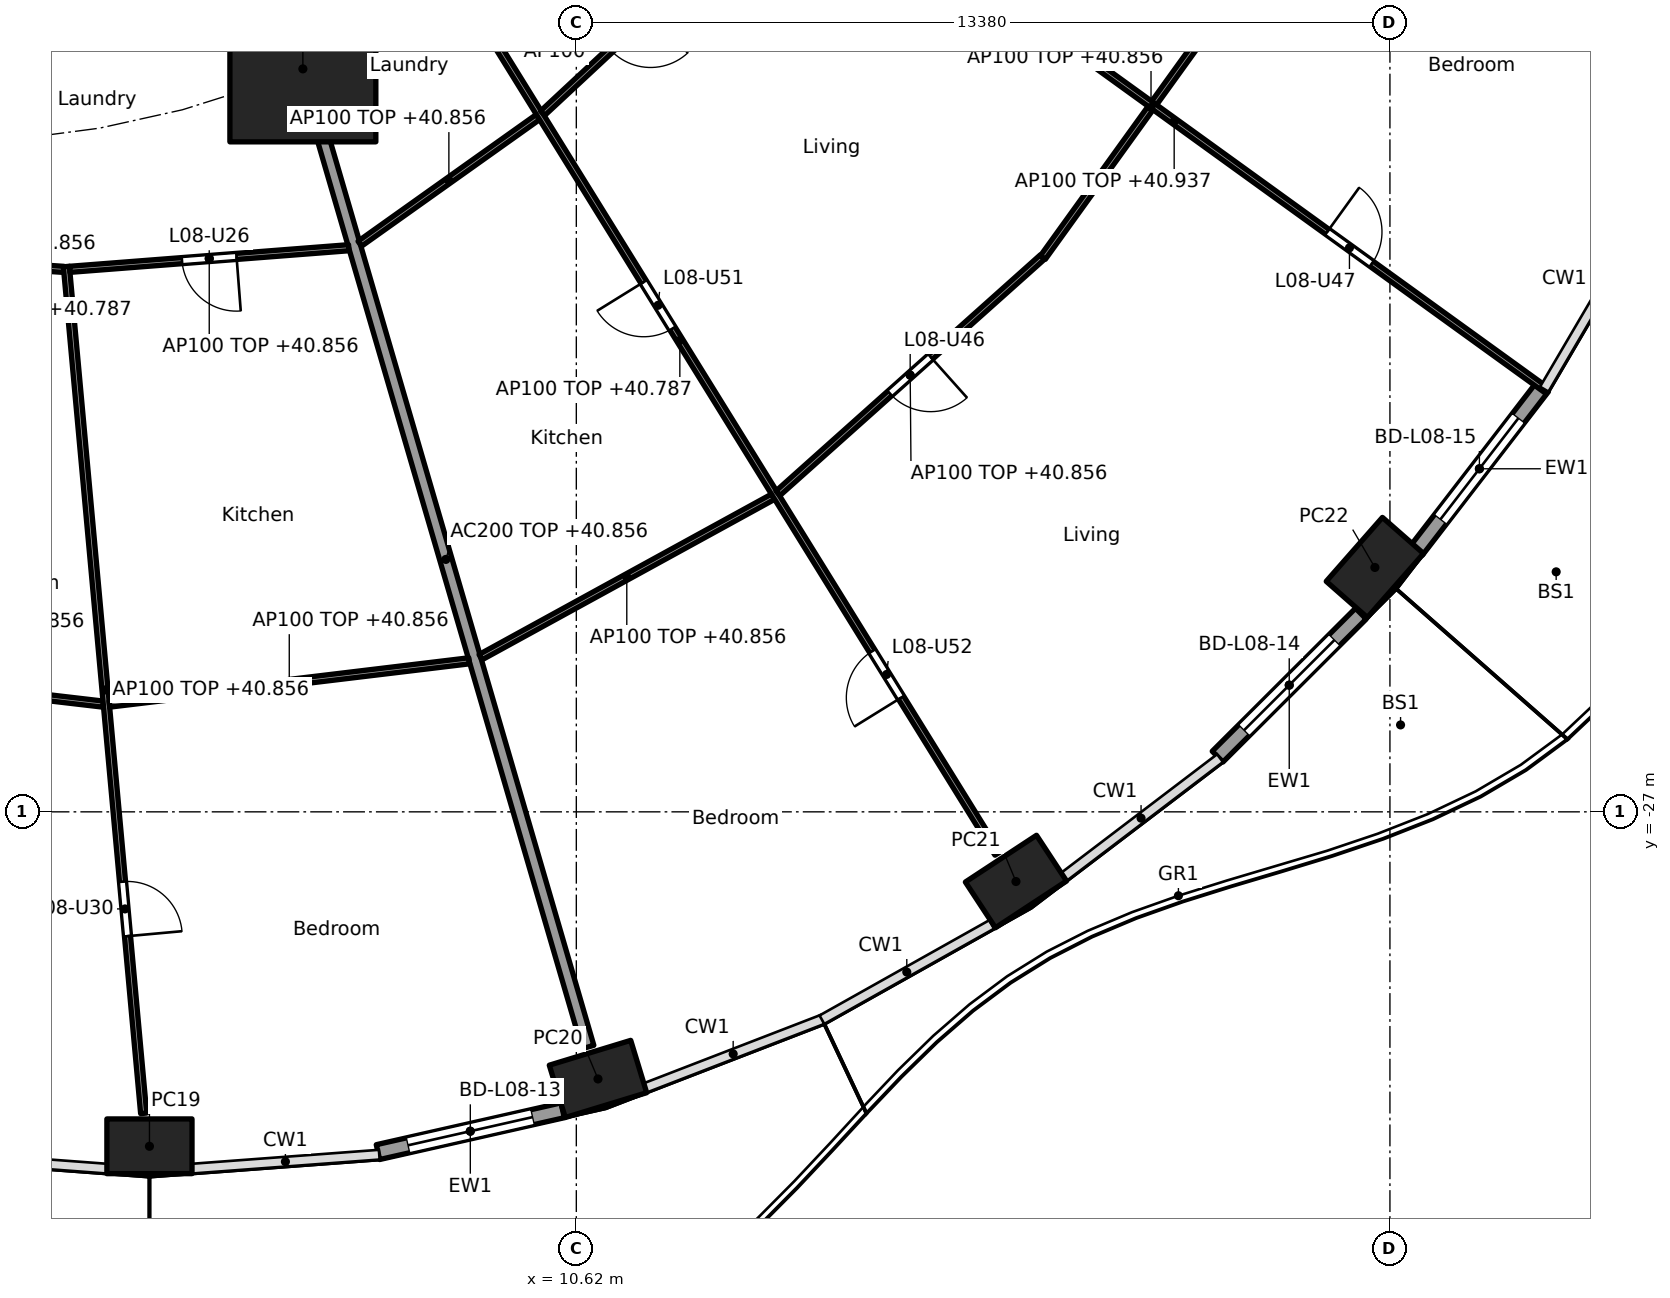
"""IFC4 building model, lengths in metres.
Left out: names, types, materials, properties, quantities, classifications, styles, units other than length and angle.
Written with IfcOpenShell. Run it as: python <this file> out.ifc"""

import sys

from ifc_helpers import new_model, si_unit, direction, frame, frame_2d, origin, origin_2d, place, context, subcontext, project, spatial, rectangle, hollow_rectangle, extrude, element, fill, save


model = new_model("IFC4")
c1 = context("Model", 3, precision=1e-05, world=origin(), true_north=direction((0.0, 1.0)))
c2 = subcontext(c1, "Body", "Model", "MODEL_VIEW")
j1 = project(units=[si_unit("LENGTHUNIT", "METRE"), si_unit("PLANEANGLEUNIT", "RADIAN")], contexts=[c1])
p1 = place(None, origin())
s1 = spatial("IfcSite", under=j1, at=p1, CompositionType="ELEMENT")
p2 = place(p1, origin())
s2 = spatial("IfcBuilding", under=s1, at=p2, CompositionType="ELEMENT")
p3 = place(p2, frame((0.0, 0.0, 38.1)))
s3 = spatial("IfcBuildingStorey", under=s2, at=p3, CompositionType="ELEMENT", Elevation=38.1)
for number, where, z_axis, x_axis in (
    (1, (3.6, -32.5, 0.0), (0.0, 0.0, 1.0), (1.0, 0.0, 0.0)),
    (2, (10.976, -31.393, 0.0), (0.0, 0.0, 1.0), (0.957, 0.292, 0.0)),
    (3, (17.85, -28.146, 0.0), (0.0, 0.0, 1.0), (0.836, 0.549, 0.0)),
    (4, (23.752, -22.981, 0.0), (0.0, 0.0, 1.0), (0.66, 0.751, 0.0)),
):
    element("IfcColumn", number, at=place(p3, frame(where, z_axis=z_axis, x_axis=x_axis)), inside=s3, PredefinedType="COLUMN", context=c2, shape_type="SweptSolid", body=[
        extrude(hollow_rectangle(XDim=1.4, YDim=0.9, WallThickness=0.05, at=origin_2d()), origin(), (0.0, 0.0, 1.0), 3.7),
    ])
p4 = place(p3, frame((6.123, -14.782, 0.0), z_axis=(0.0, 0.0, 1.0), x_axis=(1.0, 0.0, 0.0)))
e5 = element("IfcColumn", 5, at=p4, inside=s3, PredefinedType="COLUMN", context=c2, shape_type="SweptSolid", body=[
    extrude(rectangle(XDim=2.4, YDim=2.4, at=origin_2d()), origin(), (0.0, 0.0, 1.0), 3.7),
])
p5 = place(p3, frame((10.396, -31.908, 0.0), z_axis=(0.0, 0.0, 1.0), x_axis=(-0.97533495413, -0.220729987208, 0.0)))
e6 = element("IfcWall", 6, at=p5, inside=s3, PredefinedType="SOLIDWALL", context=c2, shape_type="SweptSolid", body=[
    extrude(rectangle(XDim=3.115, YDim=0.25, at=frame_2d((1.557, 0.0))), origin(), (0.0, 0.0, 1.0), 3.44),
])
p6 = place(p5, frame((0.507, 0.0, 0.0)))
e7 = element("IfcOpeningElement", 7, at=p6, cuts=e6, PredefinedType="OPENING", context=c2, shape_type="SweptSolid", body=[
    extrude(rectangle(XDim=2.1, YDim=2.4, at=frame_2d((1.05, 1.2))), frame((0.0, 0.135, 0.0), z_axis=(0.0, -1.0, 0.0), x_axis=(1.0, 0.0, 0.0)), (0.0, 0.0, 1.0), 0.27),
])
p7 = place(p3, frame((23.522, -23.74, 0.0), z_axis=(0.0, 0.0, 1.0), x_axis=(-0.707803094595, -0.706409781417, 0.0)))
e8 = element("IfcWall", 8, at=p7, inside=s3, PredefinedType="SOLIDWALL", context=c2, shape_type="SweptSolid", body=[
    extrude(rectangle(XDim=3.329, YDim=0.25, at=frame_2d((1.665, 0.0))), origin(), (0.0, 0.0, 1.0), 3.44),
])
p8 = place(p7, frame((0.615, 0.0, 0.0)))
e9 = element("IfcOpeningElement", 9, at=p8, cuts=e8, PredefinedType="OPENING", context=c2, shape_type="SweptSolid", body=[
    extrude(rectangle(XDim=2.1, YDim=2.4, at=frame_2d((1.05, 1.2))), frame((0.0, 0.135, 0.0), z_axis=(0.0, -1.0, 0.0), x_axis=(1.0, 0.0, 0.0)), (0.0, 0.0, 1.0), 0.27),
])
p9 = place(p3, frame((26.508, -20.013, 0.0), z_axis=(0.0, 0.0, 1.0), x_axis=(-0.610457147657, -0.792049285635, 0.0)))
e10 = element("IfcWall", 10, at=p9, inside=s3, PredefinedType="SOLIDWALL", context=c2, shape_type="SweptSolid", body=[
    extrude(rectangle(XDim=3.397, YDim=0.25, at=frame_2d((1.699, 0.0))), origin(), (0.0, 0.0, 1.0), 3.44),
])
p10 = place(p9, frame((0.649, 0.0, 0.0)))
e11 = element("IfcOpeningElement", 11, at=p10, cuts=e10, PredefinedType="OPENING", context=c2, shape_type="SweptSolid", body=[
    extrude(rectangle(XDim=2.1, YDim=2.4, at=frame_2d((1.05, 1.2))), frame((0.0, 0.135, 0.0), z_axis=(0.0, -1.0, 0.0), x_axis=(1.0, 0.0, 0.0)), (0.0, 0.0, 1.0), 0.27),
])
p11 = place(p3, frame((5.243, -12.657, 0.0), z_axis=(0.0, 0.0, 1.0), x_axis=(0.382707856524, -0.923869415315, 0.0)))
e12 = element("IfcWall", 12, at=p11, inside=s3, PredefinedType="PARTITIONING", context=c2, shape_type="SweptSolid", body=[
    extrude(rectangle(XDim=2.2, YDim=0.2, at=frame_2d((1.1, 0.0))), origin(), (0.0, 0.0, 1.0), 3.44),
])
p12 = place(p3, frame((6.137, -14.83, 0.0), z_axis=(0.0, 0.0, 1.0), x_axis=(0.27985745069, -0.960041565399, 0.0)))
e13 = element("IfcWall", 13, at=p12, inside=s3, PredefinedType="PARTITIONING", context=c2, shape_type="SweptSolid", body=[
    extrude(rectangle(XDim=16.705, YDim=0.2, at=frame_2d((8.353, 0.0))), origin(), (0.0, 0.0, 1.0), 2.756),
])
p13 = place(p3, frame((-3.031, -24.543, 0.0), z_axis=(0.0, 0.0, 1.0), x_axis=(0.993255612046, -0.115945198862, 0.0)))
e14 = element("IfcWall", 14, at=p13, inside=s3, PredefinedType="PARTITIONING", context=c2, shape_type="SweptSolid", body=[
    extrude(rectangle(XDim=5.913, YDim=0.1, at=frame_2d((2.956, 0.0))), origin(), (0.0, 0.0, 1.0), 2.756),
])
p14 = place(p3, frame((0.009, -17.934, 0.0), z_axis=(0.0, 0.0, 1.0), x_axis=(0.997794542617, -0.066378089183, 0.0)))
e15 = element("IfcWall", 15, at=p14, inside=s3, PredefinedType="PARTITIONING", context=c2, shape_type="SweptSolid", body=[
    extrude(rectangle(XDim=2.185, YDim=0.1, at=frame_2d((1.092, 0.0))), origin(), (0.0, 0.0, 1.0), 2.756),
])
p15 = place(p3, frame((2.234, -18.032, 0.0), z_axis=(0.0, 0.0, 1.0), x_axis=(0.090891502968, -0.995860800859, 0.0)))
e16 = element("IfcWall", 16, at=p15, inside=s3, PredefinedType="PARTITIONING", context=c2, shape_type="SweptSolid", body=[
    extrude(rectangle(XDim=13.984, YDim=0.1, at=frame_2d((6.992, 0.0))), origin(), (0.0, 0.0, 1.0), 2.756),
])
p16 = place(p15, frame((10.158, 0.0, 0.0)))
e17 = element("IfcOpeningElement", 17, at=p16, cuts=e16, PredefinedType="OPENING", context=c2, shape_type="SweptSolid", body=[
    extrude(rectangle(XDim=0.9, YDim=2.1, at=frame_2d((0.45, 1.05))), frame((0.0, 0.06, 0.0), z_axis=(0.0, -1.0, 0.0), x_axis=(1.0, 0.0, 0.0)), (0.0, 0.0, 1.0), 0.12),
])
p17 = place(p3, frame((2.288, -18.078, 0.0), z_axis=(0.0, 0.0, 1.0), x_axis=(0.99701850123, 0.077162868047, 0.0)))
e18 = element("IfcWall", 18, at=p17, inside=s3, PredefinedType="PARTITIONING", context=c2, shape_type="SweptSolid", body=[
    extrude(rectangle(XDim=4.604, YDim=0.1, at=frame_2d((2.302, 0.0))), origin(), (0.0, 0.0, 1.0), 2.756),
])
p18 = place(p17, frame((1.852, 0.0, 0.0)))
e19 = element("IfcOpeningElement", 19, at=p18, cuts=e18, PredefinedType="OPENING", context=c2, shape_type="SweptSolid", body=[
    extrude(rectangle(XDim=0.9, YDim=2.1, at=frame_2d((0.45, 1.05))), frame((0.0, 0.06, 0.0), z_axis=(0.0, -1.0, 0.0), x_axis=(1.0, 0.0, 0.0)), (0.0, 0.0, 1.0), 0.12),
])
p19 = place(p3, frame((2.941, -25.229, 0.0), z_axis=(0.0, 0.0, 1.0), x_axis=(0.992834127896, 0.119500604542, 0.0)))
e20 = element("IfcWall", 20, at=p19, inside=s3, PredefinedType="PARTITIONING", context=c2, shape_type="SweptSolid", body=[
    extrude(rectangle(XDim=5.959, YDim=0.1, at=frame_2d((2.98, 0.0))), origin(), (0.0, 0.0, 1.0), 2.756),
])
p20 = place(p3, frame((7.06, -17.657, 0.0), z_axis=(0.0, 0.0, 1.0), x_axis=(0.81492039338, 0.57957290521, 0.0)))
e21 = element("IfcWall", 21, at=p20, inside=s3, PredefinedType="PARTITIONING", context=c2, shape_type="SweptSolid", body=[
    extrude(rectangle(XDim=3.594, YDim=0.1, at=frame_2d((1.797, 0.0))), origin(), (0.0, 0.0, 1.0), 2.756),
])
p21 = place(p3, frame((9.045, -24.456, 0.0), z_axis=(0.0, 0.0, 1.0), x_axis=(0.876809987787, 0.480837025734, 0.0)))
e22 = element("IfcWall", 22, at=p21, inside=s3, PredefinedType="PARTITIONING", context=c2, shape_type="SweptSolid", body=[
    extrude(rectangle(XDim=5.486, YDim=0.1, at=frame_2d((2.743, 0.0))), origin(), (0.0, 0.0, 1.0), 2.756),
])
p22 = place(p3, frame((7.097, -10.81, 0.0), z_axis=(0.0, 0.0, 1.0), x_axis=(0.526453266471, -0.850204068576, 0.0)))
e23 = element("IfcWall", 23, at=p22, inside=s3, PredefinedType="PARTITIONING", context=c2, shape_type="SweptSolid", body=[
    extrude(rectangle(XDim=19.85, YDim=0.1, at=frame_2d((9.925, 0.0))), origin(), (0.0, 0.0, 1.0), 2.687),
])
p23 = place(p22, frame((0.35, 0.0, 0.0)))
e24 = element("IfcOpeningElement", 24, at=p23, cuts=e23, PredefinedType="OPENING", context=c2, shape_type="SweptSolid", body=[
    extrude(rectangle(XDim=0.9, YDim=2.1, at=frame_2d((0.45, 1.05))), frame((0.0, 0.06, 0.0), z_axis=(0.0, -1.0, 0.0), x_axis=(1.0, 0.0, 0.0)), (0.0, 0.0, 1.0), 0.12),
])
p24 = place(p22, frame((8.795, 0.0, 0.0)))
e25 = element("IfcOpeningElement", 25, at=p24, cuts=e23, PredefinedType="OPENING", context=c2, shape_type="SweptSolid", body=[
    extrude(rectangle(XDim=0.9, YDim=2.1, at=frame_2d((0.45, 1.05))), frame((0.0, 0.06, 0.0), z_axis=(0.0, -1.0, 0.0), x_axis=(1.0, 0.0, 0.0)), (0.0, 0.0, 1.0), 0.12),
])
p25 = place(p22, frame((15.935, 0.0, 0.0)))
e26 = element("IfcOpeningElement", 26, at=p25, cuts=e23, PredefinedType="OPENING", context=c2, shape_type="SweptSolid", body=[
    extrude(rectangle(XDim=0.9, YDim=2.1, at=frame_2d((0.45, 1.05))), frame((0.0, 0.06, 0.0), z_axis=(0.0, -1.0, 0.0), x_axis=(1.0, 0.0, 0.0)), (0.0, 0.0, 1.0), 0.12),
])
p26 = place(p3, frame((10.066, -15.511, 0.0), z_axis=(0.0, 0.0, 1.0), x_axis=(0.732022571638, 0.681280378855, 0.0)))
e27 = element("IfcWall", 27, at=p26, inside=s3, PredefinedType="PARTITIONING", context=c2, shape_type="SweptSolid", body=[
    extrude(rectangle(XDim=3.95, YDim=0.1, at=frame_2d((1.975, 0.0))), origin(), (0.0, 0.0, 1.0), 3.44),
])
p27 = place(p26, frame((1.525, 0.0, 0.0)))
e28 = element("IfcOpeningElement", 28, at=p27, cuts=e27, PredefinedType="OPENING", context=c2, shape_type="SweptSolid", body=[
    extrude(rectangle(XDim=0.9, YDim=2.1, at=frame_2d((0.45, 1.05))), frame((0.0, 0.06, 0.0), z_axis=(0.0, -1.0, 0.0), x_axis=(1.0, 0.0, 0.0)), (0.0, 0.0, 1.0), 0.12),
])
p28 = place(p3, frame((13.936, -21.761, 0.0), z_axis=(0.0, 0.0, 1.0), x_axis=(0.745806142791, 0.666163041136, 0.0)))
e29 = element("IfcWall", 29, at=p28, inside=s3, PredefinedType="PARTITIONING", context=c2, shape_type="SweptSolid", body=[
    extrude(rectangle(XDim=5.831, YDim=0.1, at=frame_2d((2.915, 0.0))), origin(), (0.0, 0.0, 1.0), 2.756),
])
p29 = place(p28, frame((2.465, 0.0, 0.0)))
e30 = element("IfcOpeningElement", 30, at=p29, cuts=e29, PredefinedType="OPENING", context=c2, shape_type="SweptSolid", body=[
    extrude(rectangle(XDim=0.9, YDim=2.1, at=frame_2d((0.45, 1.05))), frame((0.0, 0.06, 0.0), z_axis=(0.0, -1.0, 0.0), x_axis=(1.0, 0.0, 0.0)), (0.0, 0.0, 1.0), 0.12),
])
p30 = place(p3, frame((18.293, -17.884, 0.0), z_axis=(0.0, 0.0, 1.0), x_axis=(0.584558392935, 0.811351640936, 0.0)))
e31 = element("IfcWall", 31, at=p30, inside=s3, PredefinedType="PARTITIONING", context=c2, shape_type="SweptSolid", body=[
    extrude(rectangle(XDim=6.084, YDim=0.1, at=frame_2d((3.042, 0.0))), origin(), (0.0, 0.0, 1.0), 2.756),
])
p31 = place(p3, frame((14.329, -11.221, 0.0), z_axis=(0.0, 0.0, 1.0), x_axis=(0.810671130917, -0.58550176558, 0.0)))
e32 = element("IfcWall", 32, at=p31, inside=s3, PredefinedType="PARTITIONING", context=c2, shape_type="SweptSolid", body=[
    extrude(rectangle(XDim=15.106, YDim=0.1, at=frame_2d((7.553, 0.0))), origin(), (0.0, 0.0, 1.0), 2.837),
])
p32 = place(p31, frame((10.659, 0.0, 0.0)))
e33 = element("IfcOpeningElement", 33, at=p32, cuts=e32, PredefinedType="OPENING", context=c2, shape_type="SweptSolid", body=[
    extrude(rectangle(XDim=0.9, YDim=2.1, at=frame_2d((0.45, 1.05))), frame((0.0, 0.06, 0.0), z_axis=(0.0, -1.0, 0.0), x_axis=(1.0, 0.0, 0.0)), (0.0, 0.0, 1.0), 0.12),
])
p33 = place(p6, origin())
e34 = element("IfcDoor", 34, at=p33, inside=s3, OperationType="SLIDING_TO_LEFT", PredefinedType="DOOR", context=c2, shape_type="SweptSolid", body=[
    extrude(rectangle(XDim=2.1, YDim=2.4, at=frame_2d((1.05, 1.2))), frame((0.0, 0.025, 0.0), z_axis=(0.0, -1.0, 0.0), x_axis=(1.0, 0.0, 0.0)), (0.0, 0.0, 1.0), 0.05),
])
fill(e7, e34)
p34 = place(p8, origin())
e35 = element("IfcDoor", 35, at=p34, inside=s3, OperationType="SLIDING_TO_LEFT", PredefinedType="DOOR", context=c2, shape_type="SweptSolid", body=[
    extrude(rectangle(XDim=2.1, YDim=2.4, at=frame_2d((1.05, 1.2))), frame((0.0, 0.025, 0.0), z_axis=(0.0, -1.0, 0.0), x_axis=(1.0, 0.0, 0.0)), (0.0, 0.0, 1.0), 0.05),
])
fill(e9, e35)
p35 = place(p10, origin())
e36 = element("IfcDoor", 36, at=p35, inside=s3, OperationType="SLIDING_TO_LEFT", PredefinedType="DOOR", context=c2, shape_type="SweptSolid", body=[
    extrude(rectangle(XDim=2.1, YDim=2.4, at=frame_2d((1.05, 1.2))), frame((0.0, 0.025, 0.0), z_axis=(0.0, -1.0, 0.0), x_axis=(1.0, 0.0, 0.0)), (0.0, 0.0, 1.0), 0.05),
])
fill(e11, e36)
p36 = place(p18, frame((0.9, 0.0, 0.0), x_axis=(-1.0, 0.0, 0.0)))
e37 = element("IfcDoor", 37, at=p36, inside=s3, OperationType="SINGLE_SWING_LEFT", PredefinedType="DOOR", context=c2, shape_type="SweptSolid", body=[
    extrude(rectangle(XDim=0.9, YDim=2.1, at=frame_2d((0.45, 1.05))), frame((0.0, 0.025, 0.0), z_axis=(0.0, -1.0, 0.0), x_axis=(1.0, 0.0, 0.0)), (0.0, 0.0, 1.0), 0.05),
])
fill(e19, e37)
p37 = place(p16, origin())
e38 = element("IfcDoor", 38, at=p37, inside=s3, OperationType="SINGLE_SWING_RIGHT", PredefinedType="DOOR", context=c2, shape_type="SweptSolid", body=[
    extrude(rectangle(XDim=0.9, YDim=2.1, at=frame_2d((0.45, 1.05))), frame((0.0, 0.025, 0.0), z_axis=(0.0, -1.0, 0.0), x_axis=(1.0, 0.0, 0.0)), (0.0, 0.0, 1.0), 0.05),
])
fill(e17, e38)
p38 = place(p29, frame((0.9, 0.0, 0.0), x_axis=(-1.0, 0.0, 0.0)))
e39 = element("IfcDoor", 39, at=p38, inside=s3, OperationType="SINGLE_SWING_LEFT", PredefinedType="DOOR", context=c2, shape_type="SweptSolid", body=[
    extrude(rectangle(XDim=0.9, YDim=2.1, at=frame_2d((0.45, 1.05))), frame((0.0, 0.025, 0.0), z_axis=(0.0, -1.0, 0.0), x_axis=(1.0, 0.0, 0.0)), (0.0, 0.0, 1.0), 0.05),
])
fill(e30, e39)
p39 = place(p32, origin())
e40 = element("IfcDoor", 40, at=p39, inside=s3, OperationType="SINGLE_SWING_LEFT", PredefinedType="DOOR", context=c2, shape_type="SweptSolid", body=[
    extrude(rectangle(XDim=0.9, YDim=2.1, at=frame_2d((0.45, 1.05))), frame((0.0, 0.025, 0.0), z_axis=(0.0, -1.0, 0.0), x_axis=(1.0, 0.0, 0.0)), (0.0, 0.0, 1.0), 0.05),
])
fill(e33, e40)
p40 = place(p24, frame((0.9, 0.0, 0.0), x_axis=(-1.0, 0.0, 0.0)))
e41 = element("IfcDoor", 41, at=p40, inside=s3, OperationType="SINGLE_SWING_RIGHT", PredefinedType="DOOR", context=c2, shape_type="SweptSolid", body=[
    extrude(rectangle(XDim=0.9, YDim=2.1, at=frame_2d((0.45, 1.05))), frame((0.0, 0.025, 0.0), z_axis=(0.0, -1.0, 0.0), x_axis=(1.0, 0.0, 0.0)), (0.0, 0.0, 1.0), 0.05),
])
fill(e25, e41)
p41 = place(p25, frame((0.9, 0.0, 0.0), x_axis=(-1.0, 0.0, 0.0)))
e42 = element("IfcDoor", 42, at=p41, inside=s3, OperationType="SINGLE_SWING_LEFT", PredefinedType="DOOR", context=c2, shape_type="SweptSolid", body=[
    extrude(rectangle(XDim=0.9, YDim=2.1, at=frame_2d((0.45, 1.05))), frame((0.0, 0.025, 0.0), z_axis=(0.0, -1.0, 0.0), x_axis=(1.0, 0.0, 0.0)), (0.0, 0.0, 1.0), 0.05),
])
fill(e26, e42)
save(model, sys.argv[1])
